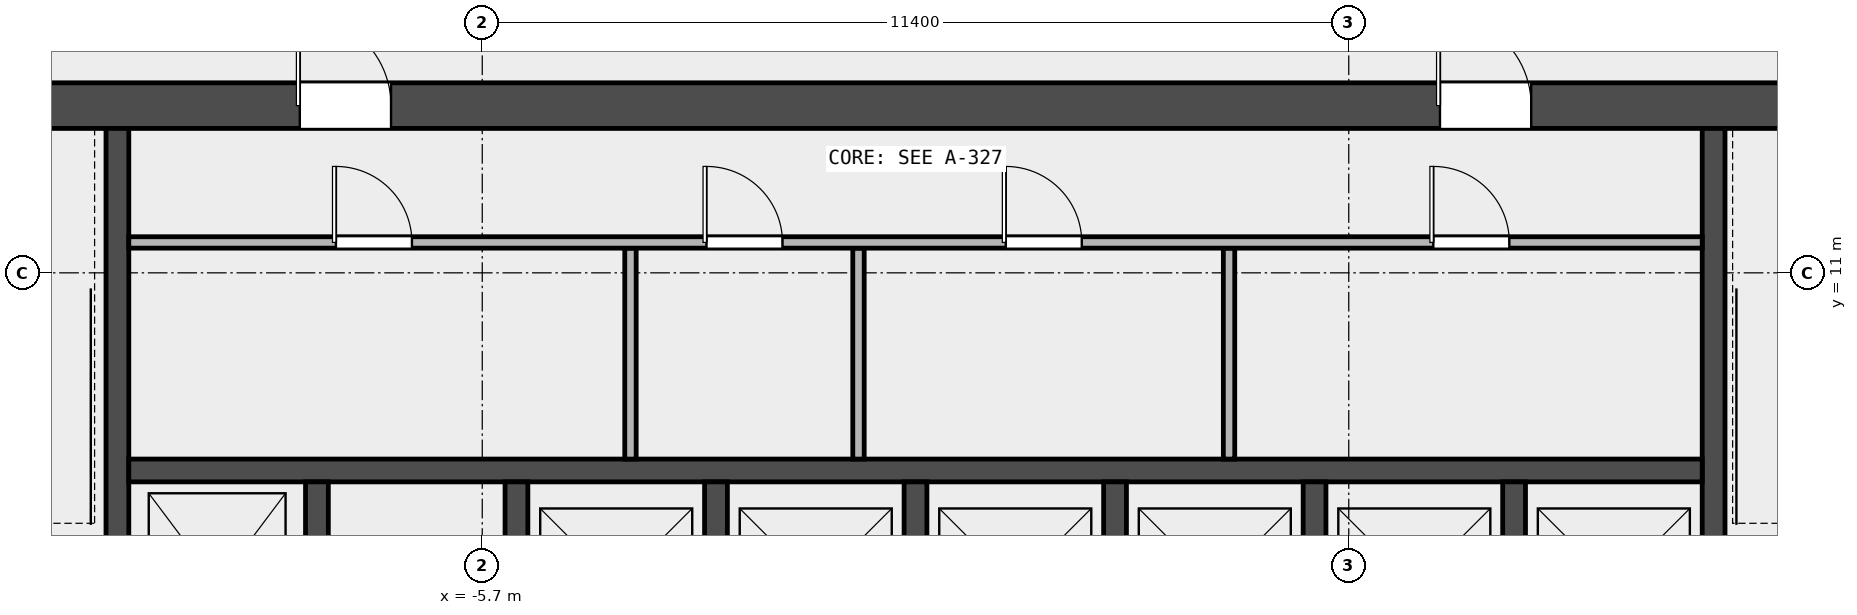
"""IFC4 building model, lengths in metres.
Left out: names, types, materials, properties, quantities, classifications, styles, units other than length and angle.
Written with IfcOpenShell. Run it as: python <this file> out.ifc"""

import sys

from ifc_helpers import new_model, si_unit, direction, frame, frame_2d, origin, place, context, subcontext, project, spatial, rectangle, extrude, element, fill, save


model = new_model("IFC4")
c1 = context("Model", 3, precision=1e-05, world=origin(), true_north=direction((0.0, 1.0)))
c2 = subcontext(c1, "Body", "Model", "MODEL_VIEW")
j1 = project(units=[si_unit("LENGTHUNIT", "METRE"), si_unit("PLANEANGLEUNIT", "RADIAN")], contexts=[c1])
p1 = place(None, origin())
s1 = spatial("IfcSite", under=j1, at=p1, CompositionType="ELEMENT")
p2 = place(p1, origin())
s2 = spatial("IfcBuilding", under=s1, at=p2, CompositionType="ELEMENT")
p3 = place(p2, frame((0.0, 0.0, 279.4)))
s3 = spatial("IfcBuildingStorey", under=s2, at=p3, CompositionType="ELEMENT", Elevation=279.4)
p4 = place(p3, frame((-14.4, 13.2, 0.0), z_axis=(0.0, 0.0, 1.0), x_axis=(1.0, 0.0, 0.0)))
e1 = element("IfcWall", 1, at=p4, inside=s3, PredefinedType="SHEAR", context=c2, shape_type="SweptSolid", body=[
    extrude(rectangle(XDim=28.8, YDim=0.6, at=frame_2d((14.4, 0.0))), origin(), (0.0, 0.0, 1.0), 3.7),
])
p5 = place(p4, frame((6.3, 0.0, 0.0)))
e2 = element("IfcOpeningElement", 2, at=p5, cuts=e1, PredefinedType="OPENING", context=c2, shape_type="SweptSolid", body=[
    extrude(rectangle(XDim=1.2, YDim=2.1, at=frame_2d((0.6, 1.05))), frame((0.0, 0.312, 0.0), z_axis=(0.0, -1.0, 0.0), x_axis=(1.0, 0.0, 0.0)), (0.0, 0.0, 1.0), 0.624),
])
p6 = place(p4, frame((21.3, 0.0, 0.0)))
e3 = element("IfcOpeningElement", 3, at=p6, cuts=e1, PredefinedType="OPENING", context=c2, shape_type="SweptSolid", body=[
    extrude(rectangle(XDim=1.2, YDim=2.1, at=frame_2d((0.6, 1.05))), frame((0.0, 0.312, 0.0), z_axis=(0.0, -1.0, 0.0), x_axis=(1.0, 0.0, 0.0)), (0.0, 0.0, 1.0), 0.624),
])
for number, where, z_axis, x_axis in (
    (4, (-10.5, 5.25, 0.0), (0.0, 0.0, 1.0), (0.0, 1.0, 0.0)),
    (5, (10.5, 5.25, 0.0), (0.0, 0.0, 1.0), (0.0, 1.0, 0.0)),
):
    element("IfcWall", number, at=place(p3, frame(where, z_axis=z_axis, x_axis=x_axis)), inside=s3, PredefinedType="SHEAR", context=c2, shape_type="SweptSolid", body=[
        extrude(rectangle(XDim=7.65, YDim=0.3, at=frame_2d((3.825, 0.0))), origin(), (0.0, 0.0, 1.0), 3.7),
    ])
p7 = place(p3, frame((-10.35, 8.4, 0.0), z_axis=(0.0, 0.0, 1.0), x_axis=(1.0, 0.0, 0.0)))
e6 = element("IfcWall", 6, at=p7, inside=s3, PredefinedType="SOLIDWALL", context=c2, shape_type="SweptSolid", body=[
    extrude(rectangle(XDim=20.7, YDim=0.3, at=frame_2d((10.35, 0.0))), origin(), (0.0, 0.0, 1.0), 3.7),
])
for number, where, z_axis, x_axis in (
    (7, (-7.875, 5.55, 0.0), (0.0, 0.0, 1.0), (0.0, 1.0, 0.0)),
    (8, (-5.25, 5.55, 0.0), (0.0, 0.0, 1.0), (0.0, 1.0, 0.0)),
    (9, (-2.625, 5.55, 0.0), (0.0, 0.0, 1.0), (0.0, 1.0, 0.0)),
    (10, (0.0, 5.55, 0.0), (0.0, 0.0, 1.0), (0.0, 1.0, 0.0)),
    (11, (2.625, 5.55, 0.0), (0.0, 0.0, 1.0), (0.0, 1.0, 0.0)),
    (12, (5.25, 5.55, 0.0), (0.0, 0.0, 1.0), (0.0, 1.0, 0.0)),
    (13, (7.875, 5.55, 0.0), (0.0, 0.0, 1.0), (0.0, 1.0, 0.0)),
):
    element("IfcWall", number, at=place(p3, frame(where, z_axis=z_axis, x_axis=x_axis)), inside=s3, PredefinedType="SOLIDWALL", context=c2, shape_type="SweptSolid", body=[
        extrude(rectangle(XDim=2.7, YDim=0.3, at=frame_2d((1.35, 0.0))), origin(), (0.0, 0.0, 1.0), 3.7),
    ])
for number, where, z_axis, x_axis in (
    (14, (-3.75, 8.55, 0.0), (0.0, 0.0, 1.0), (0.0, 1.0, 0.0)),
    (15, (-0.75, 8.55, 0.0), (0.0, 0.0, 1.0), (0.0, 1.0, 0.0)),
    (16, (4.125, 8.55, 0.0), (0.0, 0.0, 1.0), (0.0, 1.0, 0.0)),
):
    element("IfcWall", number, at=place(p3, frame(where, z_axis=z_axis, x_axis=x_axis)), inside=s3, PredefinedType="PARTITIONING", context=c2, shape_type="SweptSolid", body=[
        extrude(rectangle(XDim=2.775, YDim=0.15, at=frame_2d((1.387, 0.0))), origin(), (0.0, 0.0, 1.0), 3.7),
    ])
p8 = place(p3, frame((-10.35, 11.4, 0.0), z_axis=(0.0, 0.0, 1.0), x_axis=(1.0, 0.0, 0.0)))
e17 = element("IfcWall", 17, at=p8, inside=s3, PredefinedType="PARTITIONING", context=c2, shape_type="SweptSolid", body=[
    extrude(rectangle(XDim=20.7, YDim=0.15, at=frame_2d((10.35, 0.0))), origin(), (0.0, 0.0, 1.0), 3.7),
])
p9 = place(p8, frame((2.725, 0.0, 0.0)))
e18 = element("IfcOpeningElement", 18, at=p9, cuts=e17, PredefinedType="OPENING", context=c2, shape_type="SweptSolid", body=[
    extrude(rectangle(XDim=1.0, YDim=2.1, at=frame_2d((0.5, 1.05))), frame((0.0, 0.087, 0.0), z_axis=(0.0, -1.0, 0.0), x_axis=(1.0, 0.0, 0.0)), (0.0, 0.0, 1.0), 0.174),
])
p10 = place(p8, frame((7.6, 0.0, 0.0)))
e19 = element("IfcOpeningElement", 19, at=p10, cuts=e17, PredefinedType="OPENING", context=c2, shape_type="SweptSolid", body=[
    extrude(rectangle(XDim=1.0, YDim=2.1, at=frame_2d((0.5, 1.05))), frame((0.0, 0.087, 0.0), z_axis=(0.0, -1.0, 0.0), x_axis=(1.0, 0.0, 0.0)), (0.0, 0.0, 1.0), 0.174),
])
p11 = place(p8, frame((11.538, 0.0, 0.0)))
e20 = element("IfcOpeningElement", 20, at=p11, cuts=e17, PredefinedType="OPENING", context=c2, shape_type="SweptSolid", body=[
    extrude(rectangle(XDim=1.0, YDim=2.1, at=frame_2d((0.5, 1.05))), frame((0.0, 0.087, 0.0), z_axis=(0.0, -1.0, 0.0), x_axis=(1.0, 0.0, 0.0)), (0.0, 0.0, 1.0), 0.174),
])
p12 = place(p8, frame((17.163, 0.0, 0.0)))
e21 = element("IfcOpeningElement", 21, at=p12, cuts=e17, PredefinedType="OPENING", context=c2, shape_type="SweptSolid", body=[
    extrude(rectangle(XDim=1.0, YDim=2.1, at=frame_2d((0.5, 1.05))), frame((0.0, 0.087, 0.0), z_axis=(0.0, -1.0, 0.0), x_axis=(1.0, 0.0, 0.0)), (0.0, 0.0, 1.0), 0.174),
])
p13 = place(p9, origin())
e22 = element("IfcDoor", 22, at=p13, inside=s3, OperationType="SINGLE_SWING_LEFT", PredefinedType="DOOR", context=c2, shape_type="SweptSolid", body=[
    extrude(rectangle(XDim=1.0, YDim=2.1, at=frame_2d((0.5, 1.05))), frame((0.0, 0.025, 0.0), z_axis=(0.0, -1.0, 0.0), x_axis=(1.0, 0.0, 0.0)), (0.0, 0.0, 1.0), 0.05),
])
fill(e18, e22)
p14 = place(p10, origin())
e23 = element("IfcDoor", 23, at=p14, inside=s3, OperationType="SINGLE_SWING_LEFT", PredefinedType="DOOR", context=c2, shape_type="SweptSolid", body=[
    extrude(rectangle(XDim=1.0, YDim=2.1, at=frame_2d((0.5, 1.05))), frame((0.0, 0.025, 0.0), z_axis=(0.0, -1.0, 0.0), x_axis=(1.0, 0.0, 0.0)), (0.0, 0.0, 1.0), 0.05),
])
fill(e19, e23)
p15 = place(p11, origin())
e24 = element("IfcDoor", 24, at=p15, inside=s3, OperationType="SINGLE_SWING_LEFT", PredefinedType="DOOR", context=c2, shape_type="SweptSolid", body=[
    extrude(rectangle(XDim=1.0, YDim=2.1, at=frame_2d((0.5, 1.05))), frame((0.0, 0.025, 0.0), z_axis=(0.0, -1.0, 0.0), x_axis=(1.0, 0.0, 0.0)), (0.0, 0.0, 1.0), 0.05),
])
fill(e20, e24)
p16 = place(p12, origin())
e25 = element("IfcDoor", 25, at=p16, inside=s3, OperationType="SINGLE_SWING_LEFT", PredefinedType="DOOR", context=c2, shape_type="SweptSolid", body=[
    extrude(rectangle(XDim=1.0, YDim=2.1, at=frame_2d((0.5, 1.05))), frame((0.0, 0.025, 0.0), z_axis=(0.0, -1.0, 0.0), x_axis=(1.0, 0.0, 0.0)), (0.0, 0.0, 1.0), 0.05),
])
fill(e21, e25)
p17 = place(p5, origin())
e26 = element("IfcDoor", 26, at=p17, inside=s3, OperationType="SINGLE_SWING_LEFT", PredefinedType="DOOR", context=c2, shape_type="SweptSolid", body=[
    extrude(rectangle(XDim=1.2, YDim=2.1, at=frame_2d((0.6, 1.05))), frame((0.0, 0.025, 0.0), z_axis=(0.0, -1.0, 0.0), x_axis=(1.0, 0.0, 0.0)), (0.0, 0.0, 1.0), 0.05),
])
fill(e2, e26)
p18 = place(p6, origin())
e27 = element("IfcDoor", 27, at=p18, inside=s3, OperationType="SINGLE_SWING_RIGHT", PredefinedType="DOOR", context=c2, shape_type="SweptSolid", body=[
    extrude(rectangle(XDim=1.2, YDim=2.1, at=frame_2d((0.6, 1.05))), frame((0.0, 0.025, 0.0), z_axis=(0.0, -1.0, 0.0), x_axis=(1.0, 0.0, 0.0)), (0.0, 0.0, 1.0), 0.05),
])
fill(e3, e27)
save(model, sys.argv[1])
